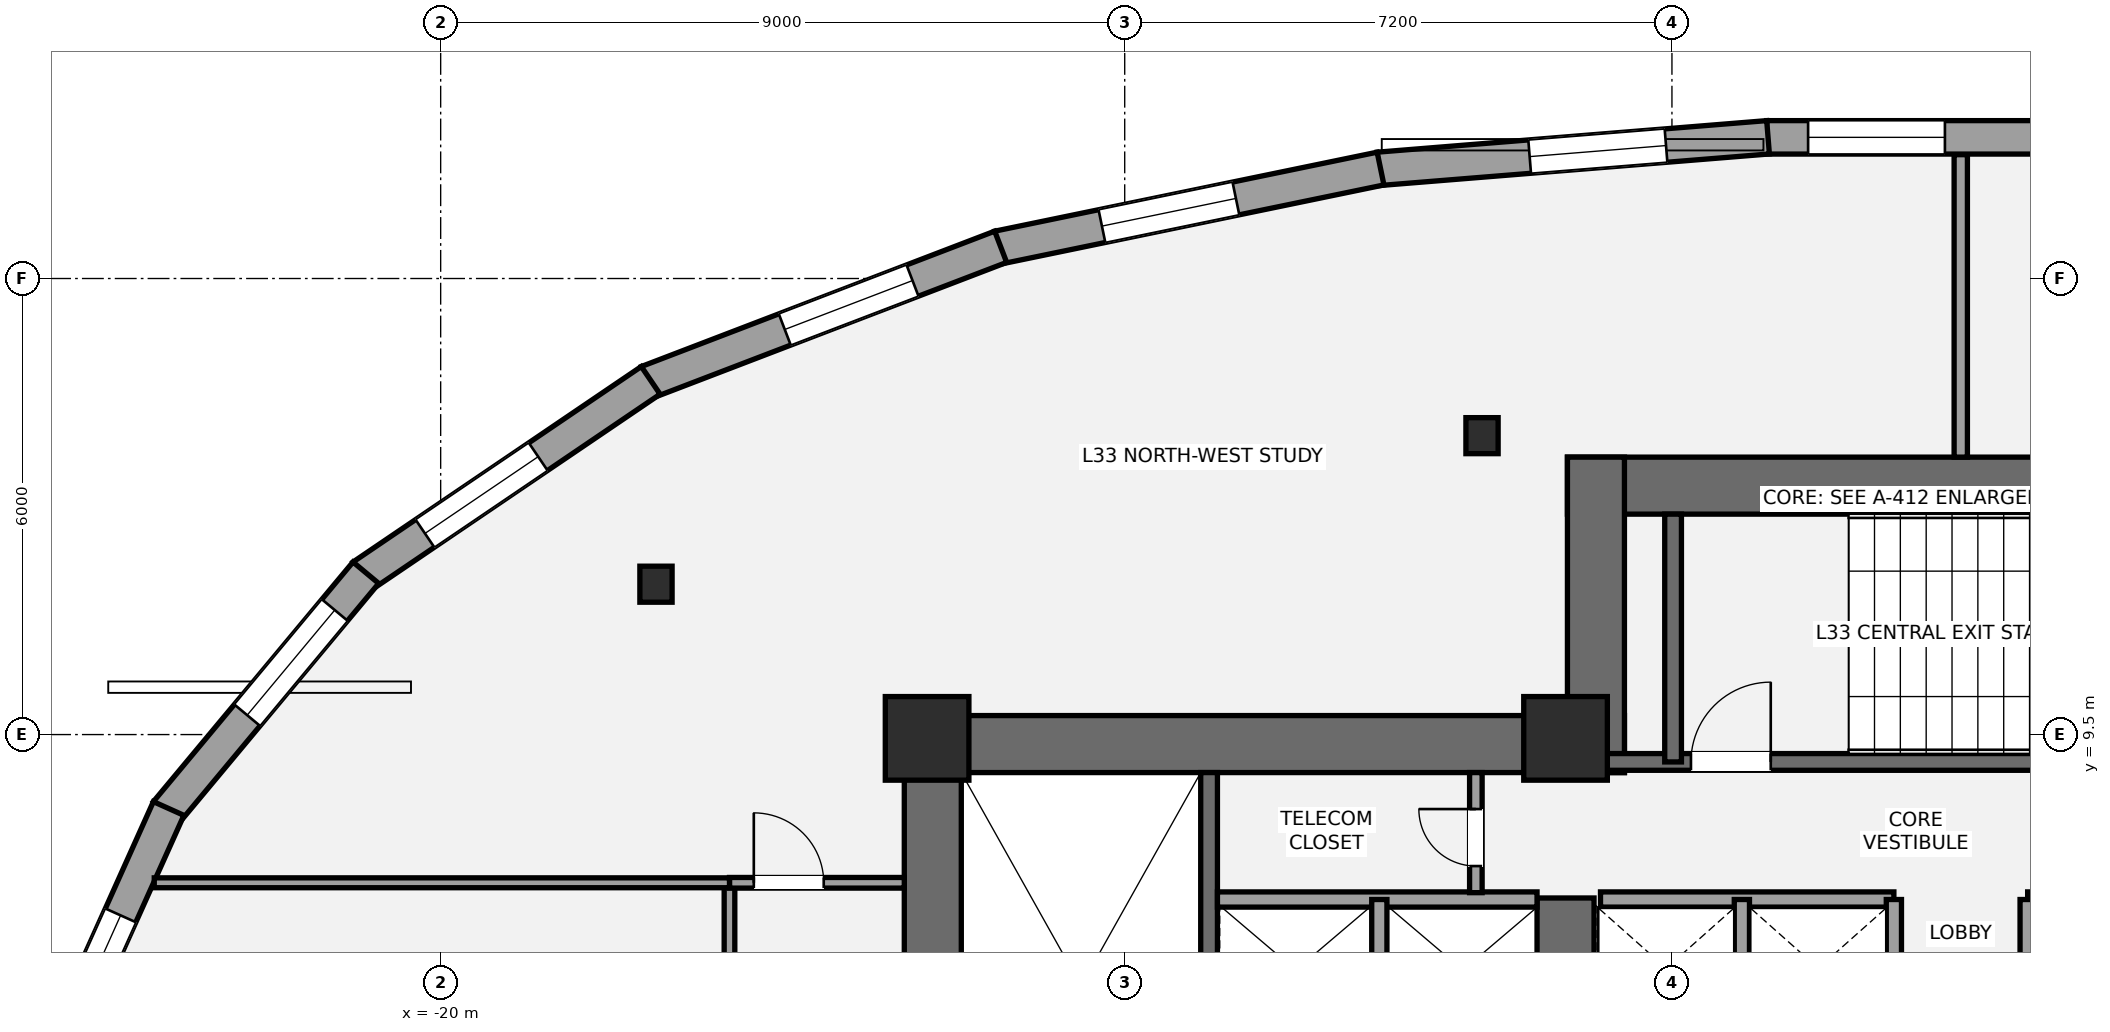
"""IFC4 building model, lengths in metres.
Left out: names, types, materials, properties, quantities, classifications, styles, units other than length and angle.
Written with IfcOpenShell. Run it as: python <this file> out.ifc"""

import sys

from ifc_helpers import new_model, si_unit, direction, frame, frame_2d, origin, origin_2d, place, context, subcontext, project, spatial, rectangle, i_section, extrude, element, fill, save


model = new_model("IFC4")
c1 = context("Model", 3, precision=1e-05, world=origin(), true_north=direction((0.0, 1.0)))
c2 = subcontext(c1, "Body", "Model", "MODEL_VIEW")
j1 = project(units=[si_unit("LENGTHUNIT", "METRE"), si_unit("PLANEANGLEUNIT", "RADIAN")], contexts=[c1])
p1 = place(None, origin())
s1 = spatial("IfcSite", under=j1, at=p1, CompositionType="ELEMENT")
p2 = place(p1, origin())
s2 = spatial("IfcBuilding", under=s1, at=p2, CompositionType="ELEMENT")
p3 = place(p2, frame((0.0, 0.0, 124.6)))
s3 = spatial("IfcBuildingStorey", under=s2, at=p3, CompositionType="ELEMENT", Elevation=124.6)
p4 = place(p3, frame((-13.525, 1.1, 0.0), z_axis=(0.0, 0.0, 1.0), x_axis=(0.0, 1.0, 0.0)))
e1 = element("IfcWall", 1, at=p4, inside=s3, PredefinedType="SHEAR", context=c2, shape_type="SweptSolid", body=[
    extrude(rectangle(XDim=8.65, YDim=0.75, at=frame_2d((4.325, 0.0))), origin(), (0.0, 0.0, 1.0), 3.5),
])
p5 = place(p3, frame((-13.9, 9.375, 0.0), z_axis=(0.0, 0.0, 1.0), x_axis=(1.0, 0.0, 0.0)))
e2 = element("IfcWall", 2, at=p5, inside=s3, PredefinedType="SHEAR", context=c2, shape_type="SweptSolid", body=[
    extrude(rectangle(XDim=9.475, YDim=0.75, at=frame_2d((4.737, 0.0))), origin(), (0.0, 0.0, 1.0), 3.5),
])
p6 = place(p3, frame((-5.2, 5.35, 0.0), z_axis=(0.0, 0.0, 1.0), x_axis=(0.0, 1.0, 0.0)))
e3 = element("IfcWall", 3, at=p6, inside=s3, PredefinedType="SHEAR", context=c2, shape_type="SweptSolid", body=[
    extrude(rectangle(XDim=2.0, YDim=0.75, at=frame_2d((1.0, 0.0))), origin(), (0.0, 0.0, 1.0), 3.5),
])
p7 = place(p3, frame((-9.89, 1.85, 0.0), z_axis=(0.0, 0.0, 1.0), x_axis=(0.0, 1.0, 0.0)))
e4 = element("IfcWall", 4, at=p7, inside=s3, PredefinedType="SHEAR", context=c2, shape_type="SweptSolid", body=[
    extrude(rectangle(XDim=7.15, YDim=0.22, at=frame_2d((3.575, 0.0))), origin(), (0.0, 0.0, 1.0), 3.5),
])
p8 = place(p3, frame((-5.175, 12.775, 0.0), z_axis=(0.0, 0.0, 1.0), x_axis=(1.0, 0.0, 0.0)))
e5 = element("IfcWall", 5, at=p8, inside=s3, PredefinedType="SHEAR", context=c2, shape_type="SweptSolid", body=[
    extrude(rectangle(XDim=10.35, YDim=0.75, at=frame_2d((5.175, 0.0))), origin(), (0.0, 0.0, 1.0), 3.5),
])
p9 = place(p3, frame((-4.8, 9.0, 0.0), z_axis=(0.0, 0.0, 1.0), x_axis=(0.0, 1.0, 0.0)))
e6 = element("IfcWall", 6, at=p9, inside=s3, PredefinedType="SHEAR", context=c2, shape_type="SweptSolid", body=[
    extrude(rectangle(XDim=4.15, YDim=0.75, at=frame_2d((2.075, 0.0))), origin(), (0.0, 0.0, 1.0), 3.5),
])
p10 = place(p3, frame((-4.7, 9.14, 0.0), z_axis=(0.0, 0.0, 1.0), x_axis=(1.0, 0.0, 0.0)))
e7 = element("IfcWall", 7, at=p10, inside=s3, PredefinedType="SHEAR", context=c2, shape_type="SweptSolid", body=[
    extrude(rectangle(XDim=9.3, YDim=0.22, at=frame_2d((4.65, 0.0))), origin(), (0.0, 0.0, 1.0), 3.5),
])
p11 = place(p10, frame((1.15, 0.0, 0.0)))
e8 = element("IfcOpeningElement", 8, at=p11, cuts=e7, PredefinedType="OPENING", context=c2, shape_type="SweptSolid", body=[
    extrude(rectangle(XDim=1.05, YDim=2.15, at=frame_2d((0.525, 1.075))), frame((0.0, 0.12, 0.0), z_axis=(0.0, -1.0, 0.0), x_axis=(1.0, 0.0, 0.0)), (0.0, 0.0, 1.0), 0.24),
])
p12 = place(p3, frame((-3.785, 9.14, 0.0), z_axis=(0.0, 0.0, 1.0), x_axis=(0.0, 1.0, 0.0)))
e9 = element("IfcWall", 9, at=p12, inside=s3, PredefinedType="SHEAR", context=c2, shape_type="SweptSolid", body=[
    extrude(rectangle(XDim=3.26, YDim=0.22, at=frame_2d((1.63, 0.0))), origin(), (0.0, 0.0, 1.0), 3.5),
])
for number, where, z_axis, x_axis in (
    (10, (-13.6, 9.45, 0.0), (0.0, 0.0, 1.0), (1.0, 0.0, 0.0)),
    (11, (-5.2, 9.45, 0.0), (0.0, 0.0, 1.0), (1.0, 0.0, 0.0)),
):
    element("IfcColumn", number, at=place(p3, frame(where, z_axis=z_axis, x_axis=x_axis)), inside=s3, PredefinedType="COLUMN", context=c2, shape_type="SweptSolid", body=[
        extrude(rectangle(XDim=1.1, YDim=1.1, at=origin_2d()), origin(), (0.0, 0.0, 1.0), 3.5),
    ])
for number, where, z_axis, x_axis in (
    (12, (-6.299, 13.433, 0.0), (0.0, 0.0, 1.0), (1.0, 0.0, 0.0)),
    (13, (-17.167, 11.478, 0.0), (0.0, 0.0, 1.0), (1.0, 0.0, 0.0)),
):
    element("IfcColumn", number, at=place(p3, frame(where, z_axis=z_axis, x_axis=x_axis)), inside=s3, PredefinedType="COLUMN", context=c2, shape_type="SweptSolid", body=[
        extrude(i_section(OverallWidth=0.424, OverallDepth=0.474, WebThickness=0.048, FlangeThickness=0.077, at=origin_2d()), origin(), (0.0, 0.0, 1.0), 3.5),
    ])
p13 = place(p3, frame((-2.553, 17.357, 0.0), z_axis=(0.0, 0.0, 1.0), x_axis=(1.0, 0.0, 0.0)))
e14 = element("IfcWall", 14, at=p13, inside=s3, PredefinedType="STANDARD", context=c2, shape_type="SweptSolid", body=[
    extrude(rectangle(XDim=5.107, YDim=0.44, at=frame_2d((2.553, 0.0))), origin(), (0.0, 0.0, 1.0), 2.528),
])
p14 = place(p13, frame((0.545, 0.0, 0.65)))
e15 = element("IfcOpeningElement", 15, at=p14, cuts=e14, PredefinedType="OPENING", context=c2, shape_type="SweptSolid", body=[
    extrude(rectangle(XDim=1.8, YDim=1.7, at=frame_2d((0.9, 0.85))), frame((0.0, 0.23, 0.0), z_axis=(0.0, -1.0, 0.0), x_axis=(1.0, 0.0, 0.0)), (0.0, 0.0, 1.0), 0.46),
])
p15 = place(p3, frame((-7.661, 16.943, 0.0), z_axis=(0.0, 0.0, 1.0), x_axis=(0.996733078328, 0.080766147401, 0.0)))
e16 = element("IfcWall", 16, at=p15, inside=s3, PredefinedType="STANDARD", context=c2, shape_type="SweptSolid", body=[
    extrude(rectangle(XDim=5.142, YDim=0.44, at=frame_2d((2.571, 0.0))), origin(), (0.0, 0.0, 1.0), 2.528),
])
p16 = place(p15, frame((1.995, 0.0, 0.65)))
e17 = element("IfcOpeningElement", 17, at=p16, cuts=e16, PredefinedType="OPENING", context=c2, shape_type="SweptSolid", body=[
    extrude(rectangle(XDim=1.8, YDim=1.7, at=frame_2d((0.9, 0.85))), frame((0.0, 0.23, 0.0), z_axis=(0.0, -1.0, 0.0), x_axis=(1.0, 0.0, 0.0)), (0.0, 0.0, 1.0), 0.46),
])
p17 = place(p3, frame((-12.666, 15.907, 0.0), z_axis=(0.0, 0.0, 1.0), x_axis=(0.979339014215, 0.202225357552, 0.0)))
e18 = element("IfcWall", 18, at=p17, inside=s3, PredefinedType="STANDARD", context=c2, shape_type="SweptSolid", body=[
    extrude(rectangle(XDim=5.138, YDim=0.44, at=frame_2d((2.569, 0.0))), origin(), (0.0, 0.0, 1.0), 2.528),
])
p18 = place(p17, frame((1.395, 0.0, 0.65)))
e19 = element("IfcOpeningElement", 19, at=p18, cuts=e18, PredefinedType="OPENING", context=c2, shape_type="SweptSolid", body=[
    extrude(rectangle(XDim=1.8, YDim=1.7, at=frame_2d((0.9, 0.85))), frame((0.0, 0.23, 0.0), z_axis=(0.0, -1.0, 0.0), x_axis=(1.0, 0.0, 0.0)), (0.0, 0.0, 1.0), 0.46),
])
p19 = place(p3, frame((-17.281, 14.136, 0.0), z_axis=(0.0, 0.0, 1.0), x_axis=(0.933853964101, 0.357654545243, 0.0)))
e20 = element("IfcWall", 20, at=p19, inside=s3, PredefinedType="STANDARD", context=c2, shape_type="SweptSolid", body=[
    extrude(rectangle(XDim=4.979, YDim=0.44, at=frame_2d((2.49, 0.0))), origin(), (0.0, 0.0, 1.0), 2.528),
])
p20 = place(p19, frame((1.937, 0.0, 0.65)))
e21 = element("IfcOpeningElement", 21, at=p20, cuts=e20, PredefinedType="OPENING", context=c2, shape_type="SweptSolid", body=[
    extrude(rectangle(XDim=1.8, YDim=1.7, at=frame_2d((0.9, 0.85))), frame((0.0, 0.23, 0.0), z_axis=(0.0, -1.0, 0.0), x_axis=(1.0, 0.0, 0.0)), (0.0, 0.0, 1.0), 0.46),
])
p21 = place(p3, frame((-21.03, 11.588, 0.0), z_axis=(0.0, 0.0, 1.0), x_axis=(0.827672849676, 0.561210881852, 0.0)))
e22 = element("IfcWall", 22, at=p21, inside=s3, PredefinedType="STANDARD", context=c2, shape_type="SweptSolid", body=[
    extrude(rectangle(XDim=4.583, YDim=0.44, at=frame_2d((2.292, 0.0))), origin(), (0.0, 0.0, 1.0), 2.528),
])
p22 = place(p21, frame((0.994, 0.0, 0.65)))
e23 = element("IfcOpeningElement", 23, at=p22, cuts=e22, PredefinedType="OPENING", context=c2, shape_type="SweptSolid", body=[
    extrude(rectangle(XDim=1.8, YDim=1.7, at=frame_2d((0.9, 0.85))), frame((0.0, 0.23, 0.0), z_axis=(0.0, -1.0, 0.0), x_axis=(1.0, 0.0, 0.0)), (0.0, 0.0, 1.0), 0.46),
])
p23 = place(p3, frame((-23.611, 8.477, 0.0), z_axis=(0.0, 0.0, 1.0), x_axis=(0.640084904994, 0.768304180906, 0.0)))
e24 = element("IfcWall", 24, at=p23, inside=s3, PredefinedType="STANDARD", context=c2, shape_type="SweptSolid", body=[
    extrude(rectangle(XDim=4.103, YDim=0.44, at=frame_2d((2.052, 0.0))), origin(), (0.0, 0.0, 1.0), 2.528),
])
p24 = place(p23, frame((1.664, 0.0, 0.65)))
e25 = element("IfcOpeningElement", 25, at=p24, cuts=e24, PredefinedType="OPENING", context=c2, shape_type="SweptSolid", body=[
    extrude(rectangle(XDim=1.8, YDim=1.7, at=frame_2d((0.9, 0.85))), frame((0.0, 0.23, 0.0), z_axis=(0.0, -1.0, 0.0), x_axis=(1.0, 0.0, 0.0)), (0.0, 0.0, 1.0), 0.46),
])
p25 = place(p3, frame((-25.112, 5.116, 0.0), z_axis=(0.0, 0.0, 1.0), x_axis=(0.409835385481, 0.912159501846, 0.0)))
e26 = element("IfcWall", 26, at=p25, inside=s3, PredefinedType="STANDARD", context=c2, shape_type="SweptSolid", body=[
    extrude(rectangle(XDim=3.74, YDim=0.44, at=frame_2d((1.87, 0.0))), origin(), (0.0, 0.0, 1.0), 2.528),
])
p26 = place(p25, frame((0.399, 0.0, 0.65)))
e27 = element("IfcOpeningElement", 27, at=p26, cuts=e26, PredefinedType="OPENING", context=c2, shape_type="SweptSolid", body=[
    extrude(rectangle(XDim=1.8, YDim=1.7, at=frame_2d((0.9, 0.85))), frame((0.0, 0.23, 0.0), z_axis=(0.0, -1.0, 0.0), x_axis=(1.0, 0.0, 0.0)), (0.0, 0.0, 1.0), 0.46),
])
p27 = place(p3, frame((-9.78, 7.33, 0.0), z_axis=(0.0, 0.0, 1.0), x_axis=(1.0, 0.0, 0.0)))
e28 = element("IfcWall", 28, at=p27, inside=s3, PredefinedType="SOLIDWALL", context=c2, shape_type="SweptSolid", body=[
    extrude(rectangle(XDim=4.205, YDim=0.2, at=frame_2d((2.103, 0.0))), origin(), (0.0, 0.0, 1.0), 3.31),
])
p28 = place(p3, frame((-7.65, 5.47, 0.0), z_axis=(0.0, 0.0, 1.0), x_axis=(0.0, 1.0, 0.0)))
e29 = element("IfcWall", 29, at=p28, inside=s3, PredefinedType="SOLIDWALL", context=c2, shape_type="SweptSolid", body=[
    extrude(rectangle(XDim=1.86, YDim=0.2, at=frame_2d((0.93, 0.0))), origin(), (0.0, 0.0, 1.0), 3.31),
])
for number, where, z_axis, x_axis in (
    (30, (-4.74, 7.33, 0.0), (0.0, 0.0, 1.0), (1.0, 0.0, 0.0)),
    (31, (0.88, 7.33, 0.0), (0.0, 0.0, 1.0), (1.0, 0.0, 0.0)),
):
    element("IfcWall", number, at=place(p3, frame(where, z_axis=z_axis, x_axis=x_axis)), inside=s3, PredefinedType="SOLIDWALL", context=c2, shape_type="SweptSolid", body=[
        extrude(rectangle(XDim=3.86, YDim=0.2, at=frame_2d((1.93, 0.0))), origin(), (0.0, 0.0, 1.0), 3.31),
    ])
for number, where, z_axis, x_axis in (
    (32, (-2.88, 5.52, 0.0), (0.0, 0.0, 1.0), (0.0, 1.0, 0.0)),
    (33, (-0.88, 5.52, 0.0), (0.0, 0.0, 1.0), (0.0, 1.0, 0.0)),
    (34, (0.88, 5.52, 0.0), (0.0, 0.0, 1.0), (0.0, 1.0, 0.0)),
):
    element("IfcWall", number, at=place(p3, frame(where, z_axis=z_axis, x_axis=x_axis)), inside=s3, PredefinedType="SOLIDWALL", context=c2, shape_type="SweptSolid", body=[
        extrude(rectangle(XDim=1.81, YDim=0.2, at=frame_2d((0.905, 0.0))), origin(), (0.0, 0.0, 1.0), 3.31),
    ])
p29 = place(p3, frame((-6.38, 7.42, 0.0), z_axis=(0.0, 0.0, 1.0), x_axis=(0.0, 1.0, 0.0)))
e35 = element("IfcWall", 35, at=p29, inside=s3, PredefinedType="PARTITIONING", context=c2, shape_type="SweptSolid", body=[
    extrude(rectangle(XDim=1.58, YDim=0.165, at=frame_2d((0.79, 0.0))), origin(), (0.0, 0.0, 1.0), 3.31),
])
p30 = place(p29, frame((0.35, 0.0, 0.0)))
e36 = element("IfcOpeningElement", 36, at=p30, cuts=e35, PredefinedType="OPENING", context=c2, shape_type="SweptSolid", body=[
    extrude(rectangle(XDim=0.75, YDim=2.1, at=frame_2d((0.375, 1.05))), frame((0.0, 0.093, 0.0), z_axis=(0.0, -1.0, 0.0), x_axis=(1.0, 0.0, 0.0)), (0.0, 0.0, 1.0), 0.185),
])
p31 = place(p3, frame((-16.2, -14.306, 0.0), z_axis=(0.0, 0.0, 1.0), x_axis=(0.0, 1.0, 0.0)))
e37 = element("IfcWall", 37, at=p31, inside=s3, PredefinedType="PARTITIONING", context=c2, shape_type="SweptSolid", body=[
    extrude(rectangle(XDim=21.856, YDim=0.14, at=frame_2d((10.928, 0.0))), origin(), (0.0, 0.0, 1.0), 2.763),
])
p32 = place(p31, frame((10.156, 0.0, 0.0)))
e38 = element("IfcOpeningElement", 38, at=p32, cuts=e37, PredefinedType="OPENING", context=c2, shape_type="SweptSolid", body=[
    extrude(rectangle(XDim=0.9, YDim=2.1, at=frame_2d((0.45, 1.05))), frame((0.0, 0.08, 0.0), z_axis=(0.0, -1.0, 0.0), x_axis=(1.0, 0.0, 0.0)), (0.0, 0.0, 1.0), 0.16),
])
p33 = place(p31, frame((14.956, 0.0, 0.0)))
e39 = element("IfcOpeningElement", 39, at=p33, cuts=e37, PredefinedType="OPENING", context=c2, shape_type="SweptSolid", body=[
    extrude(rectangle(XDim=0.9, YDim=2.1, at=frame_2d((0.45, 1.05))), frame((0.0, 0.08, 0.0), z_axis=(0.0, -1.0, 0.0), x_axis=(1.0, 0.0, 0.0)), (0.0, 0.0, 1.0), 0.16),
])
p34 = place(p31, frame((19.331, 0.0, 0.0)))
e40 = element("IfcOpeningElement", 40, at=p34, cuts=e37, PredefinedType="OPENING", context=c2, shape_type="SweptSolid", body=[
    extrude(rectangle(XDim=0.9, YDim=2.1, at=frame_2d((0.45, 1.05))), frame((0.0, 0.08, 0.0), z_axis=(0.0, -1.0, 0.0), x_axis=(1.0, 0.0, 0.0)), (0.0, 0.0, 1.0), 0.16),
])
p35 = place(p3, frame((-16.2, 7.55, 0.0), z_axis=(0.0, 0.0, 1.0), x_axis=(1.0, 0.0, 0.0)))
e41 = element("IfcWall", 41, at=p35, inside=s3, PredefinedType="PARTITIONING", context=c2, shape_type="SweptSolid", body=[
    extrude(rectangle(XDim=2.3, YDim=0.14, at=frame_2d((1.15, 0.0))), origin(), (0.0, 0.0, 1.0), 3.31),
])
p36 = place(p35, frame((0.32, 0.0, 0.0)))
e42 = element("IfcOpeningElement", 42, at=p36, cuts=e41, PredefinedType="OPENING", context=c2, shape_type="SweptSolid", body=[
    extrude(rectangle(XDim=0.92, YDim=2.15, at=frame_2d((0.46, 1.075))), frame((0.0, 0.08, 0.0), z_axis=(0.0, -1.0, 0.0), x_axis=(1.0, 0.0, 0.0)), (0.0, 0.0, 1.0), 0.16),
])
p37 = place(p3, frame((0.0, 13.15, 0.0), z_axis=(0.0, 0.0, 1.0), x_axis=(0.0, 1.0, 0.0)))
e43 = element("IfcWall", 43, at=p37, inside=s3, PredefinedType="PARTITIONING", context=c2, shape_type="SweptSolid", body=[
    extrude(rectangle(XDim=3.979, YDim=0.175, at=frame_2d((1.99, 0.0))), origin(), (0.0, 0.0, 1.0), 3.31),
])
p38 = place(p3, frame((-23.768, 7.55, 0.0), z_axis=(0.0, 0.0, 1.0), x_axis=(1.0, 0.0, 0.0)))
e44 = element("IfcWall", 44, at=p38, inside=s3, PredefinedType="PARTITIONING", context=c2, shape_type="SweptSolid", body=[
    extrude(rectangle(XDim=7.568, YDim=0.13, at=frame_2d((3.784, 0.0))), origin(), (0.0, 0.0, 1.0), 3.31),
])
p39 = place(p14, origin())
e45 = element("IfcWindow", 45, at=p39, inside=s3, PartitioningType="SINGLE_PANEL", PredefinedType="WINDOW", context=c2, shape_type="SweptSolid", body=[
    extrude(rectangle(XDim=1.8, YDim=1.7, at=frame_2d((0.9, 0.85))), frame((0.0, -0.01, 0.0), z_axis=(0.0, -1.0, 0.0), x_axis=(1.0, 0.0, 0.0)), (0.0, 0.0, 1.0), 0.06),
])
fill(e15, e45)
p40 = place(p16, origin())
e46 = element("IfcWindow", 46, at=p40, inside=s3, PartitioningType="SINGLE_PANEL", PredefinedType="WINDOW", context=c2, shape_type="SweptSolid", body=[
    extrude(rectangle(XDim=1.8, YDim=1.7, at=frame_2d((0.9, 0.85))), frame((0.0, -0.01, 0.0), z_axis=(0.0, -1.0, 0.0), x_axis=(1.0, 0.0, 0.0)), (0.0, 0.0, 1.0), 0.06),
])
fill(e17, e46)
p41 = place(p18, origin())
e47 = element("IfcWindow", 47, at=p41, inside=s3, PartitioningType="SINGLE_PANEL", PredefinedType="WINDOW", context=c2, shape_type="SweptSolid", body=[
    extrude(rectangle(XDim=1.8, YDim=1.7, at=frame_2d((0.9, 0.85))), frame((0.0, -0.01, 0.0), z_axis=(0.0, -1.0, 0.0), x_axis=(1.0, 0.0, 0.0)), (0.0, 0.0, 1.0), 0.06),
])
fill(e19, e47)
p42 = place(p20, origin())
e48 = element("IfcWindow", 48, at=p42, inside=s3, PartitioningType="SINGLE_PANEL", PredefinedType="WINDOW", context=c2, shape_type="SweptSolid", body=[
    extrude(rectangle(XDim=1.8, YDim=1.7, at=frame_2d((0.9, 0.85))), frame((0.0, -0.01, 0.0), z_axis=(0.0, -1.0, 0.0), x_axis=(1.0, 0.0, 0.0)), (0.0, 0.0, 1.0), 0.06),
])
fill(e21, e48)
p43 = place(p22, origin())
e49 = element("IfcWindow", 49, at=p43, inside=s3, PartitioningType="SINGLE_PANEL", PredefinedType="WINDOW", context=c2, shape_type="SweptSolid", body=[
    extrude(rectangle(XDim=1.8, YDim=1.7, at=frame_2d((0.9, 0.85))), frame((0.0, -0.01, 0.0), z_axis=(0.0, -1.0, 0.0), x_axis=(1.0, 0.0, 0.0)), (0.0, 0.0, 1.0), 0.06),
])
fill(e23, e49)
p44 = place(p24, origin())
e50 = element("IfcWindow", 50, at=p44, inside=s3, PartitioningType="SINGLE_PANEL", PredefinedType="WINDOW", context=c2, shape_type="SweptSolid", body=[
    extrude(rectangle(XDim=1.8, YDim=1.7, at=frame_2d((0.9, 0.85))), frame((0.0, -0.01, 0.0), z_axis=(0.0, -1.0, 0.0), x_axis=(1.0, 0.0, 0.0)), (0.0, 0.0, 1.0), 0.06),
])
fill(e25, e50)
p45 = place(p26, origin())
e51 = element("IfcWindow", 51, at=p45, inside=s3, PartitioningType="SINGLE_PANEL", PredefinedType="WINDOW", context=c2, shape_type="SweptSolid", body=[
    extrude(rectangle(XDim=1.8, YDim=1.7, at=frame_2d((0.9, 0.85))), frame((0.0, -0.01, 0.0), z_axis=(0.0, -1.0, 0.0), x_axis=(1.0, 0.0, 0.0)), (0.0, 0.0, 1.0), 0.06),
])
fill(e27, e51)
p46 = place(p11, origin())
e52 = element("IfcDoor", 52, at=p46, inside=s3, OperationType="SINGLE_SWING_RIGHT", PredefinedType="DOOR", context=c2, shape_type="SweptSolid", body=[
    extrude(rectangle(XDim=1.05, YDim=2.15, at=frame_2d((0.525, 1.075))), frame((0.0, 0.025, 0.0), z_axis=(0.0, -1.0, 0.0), x_axis=(1.0, 0.0, 0.0)), (0.0, 0.0, 1.0), 0.05),
])
fill(e8, e52)
p47 = place(p30, origin())
e53 = element("IfcDoor", 53, at=p47, inside=s3, OperationType="SINGLE_SWING_RIGHT", PredefinedType="DOOR", context=c2, shape_type="SweptSolid", body=[
    extrude(rectangle(XDim=0.75, YDim=2.1, at=frame_2d((0.375, 1.05))), frame((0.0, 0.025, 0.0), z_axis=(0.0, -1.0, 0.0), x_axis=(1.0, 0.0, 0.0)), (0.0, 0.0, 1.0), 0.05),
])
fill(e36, e53)
p48 = place(p36, origin())
e54 = element("IfcDoor", 54, at=p48, inside=s3, OperationType="SINGLE_SWING_LEFT", PredefinedType="DOOR", context=c2, shape_type="SweptSolid", body=[
    extrude(rectangle(XDim=0.92, YDim=2.15, at=frame_2d((0.46, 1.075))), frame((0.0, 0.025, 0.0), z_axis=(0.0, -1.0, 0.0), x_axis=(1.0, 0.0, 0.0)), (0.0, 0.0, 1.0), 0.05),
])
fill(e42, e54)
save(model, sys.argv[1])
